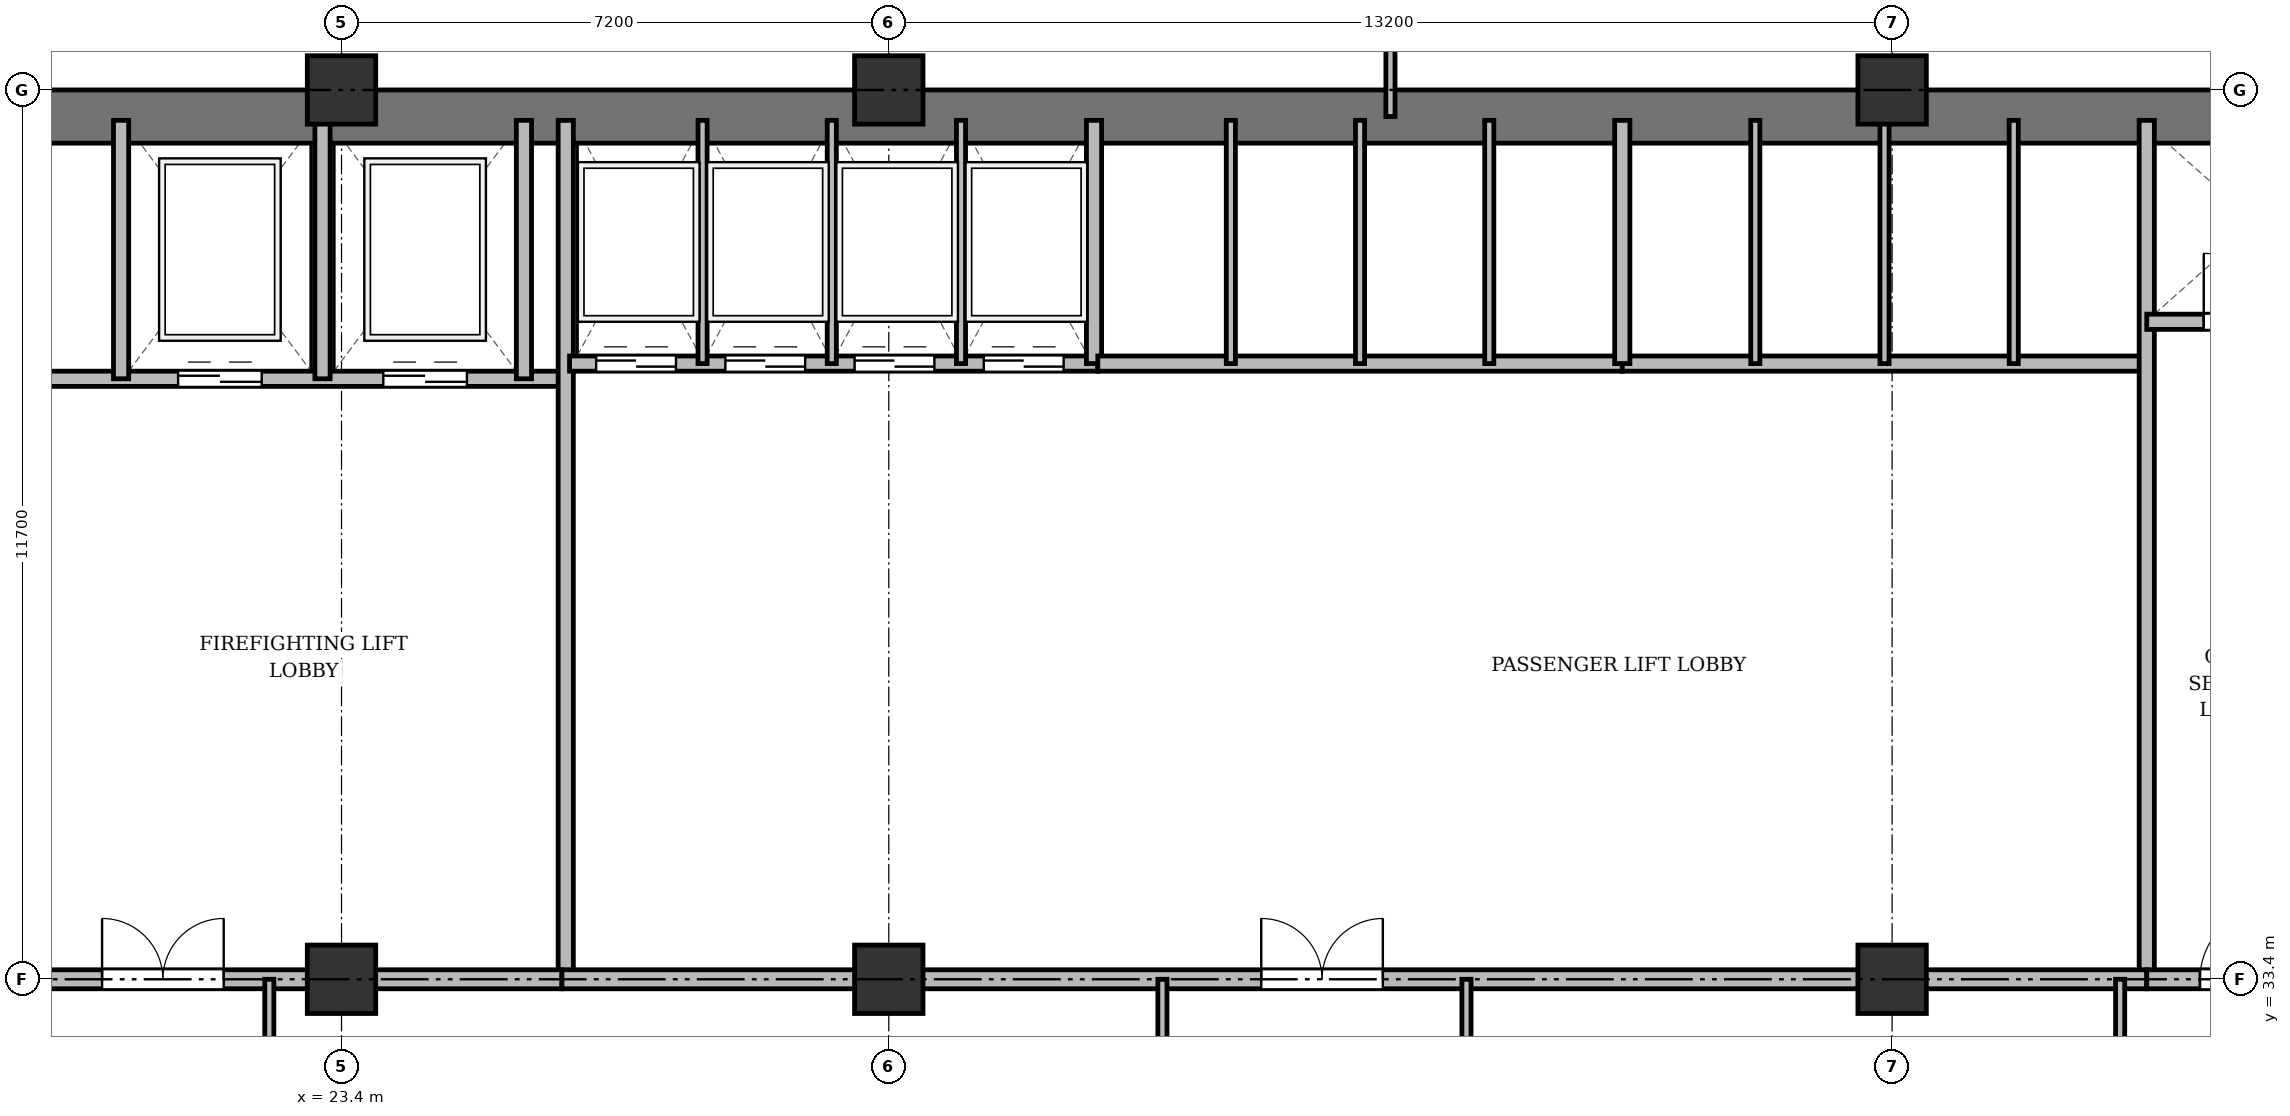
"""IFC4 building model, lengths in metres.
Left out: names, types, materials, properties, quantities, classifications, styles, units other than length and angle.
Written with IfcOpenShell. Run it as: python <this file> out.ifc"""

import sys

from ifc_helpers import new_model, si_unit, direction, frame, frame_2d, origin, origin_2d, place, context, subcontext, project, spatial, rectangle, extrude, source, transform, mapped, element, fill, save


model = new_model("IFC4")
c1 = context("Model", 3, precision=1e-05, world=origin(), true_north=direction((0.0, 1.0)))
c2 = subcontext(c1, "Body", "Model", "MODEL_VIEW")
j1 = project(units=[si_unit("LENGTHUNIT", "METRE"), si_unit("PLANEANGLEUNIT", "RADIAN")], contexts=[c1])
p1 = place(None, origin())
s1 = spatial("IfcSite", under=j1, at=p1, CompositionType="ELEMENT")
p2 = place(p1, origin())
s2 = spatial("IfcBuilding", under=s1, at=p2, CompositionType="ELEMENT")
p3 = place(p2, frame((0.0, 0.0, 41.5)))
s3 = spatial("IfcBuildingStorey", under=s2, at=p3, CompositionType="ELEMENT", Elevation=41.5)
m1 = source(origin(), c2, "Body", "SweptSolid", [
    extrude(rectangle(XDim=0.9, YDim=0.9, at=origin_2d()), origin(), (0.0, 0.0, 1.0), 3.6),
])
for number, where, z_axis, x_axis in (
    (1, (23.4, 33.4, 0.0), (0.0, 0.0, 1.0), (1.0, 0.0, 0.0)),
    (2, (23.4, 45.1, 0.0), (0.0, 0.0, 1.0), (1.0, 0.0, 0.0)),
    (3, (30.6, 33.4, 0.0), (0.0, 0.0, 1.0), (1.0, 0.0, 0.0)),
    (4, (30.6, 45.1, 0.0), (0.0, 0.0, 1.0), (1.0, 0.0, 0.0)),
    (5, (43.8, 33.4, 0.0), (0.0, 0.0, 1.0), (1.0, 0.0, 0.0)),
    (6, (43.8, 45.1, 0.0), (0.0, 0.0, 1.0), (1.0, 0.0, 0.0)),
):
    element("IfcColumn", number, at=place(p3, frame(where, z_axis=z_axis, x_axis=x_axis)), inside=s3, PredefinedType="COLUMN", context=c2, shape_type="MappedRepresentation", body=[
        mapped(m1, transform((0.0, 0.0, 0.0), x_axis=(1.0, 0.0, 0.0), y_axis=(0.0, 1.0, 0.0), z_axis=(0.0, 0.0, 1.0), scale=1.0)),
    ])
p4 = place(p3, frame((15.5, 44.75, 0.0), z_axis=(0.0, 0.0, 1.0), x_axis=(1.0, 0.0, 0.0)))
e7 = element("IfcWall", 7, at=p4, inside=s3, PredefinedType="SHEAR", context=c2, shape_type="SweptSolid", body=[
    extrude(rectangle(XDim=43.4, YDim=0.7, at=frame_2d((21.7, 0.0))), origin(), (0.0, 0.0, 1.0), 3.34),
])
p5 = place(p3, frame((19.55, 41.3, 0.0), z_axis=(0.0, 0.0, 1.0), x_axis=(1.0, 0.0, 0.0)))
e8 = element("IfcWall", 8, at=p5, inside=s3, PredefinedType="SOLIDWALL", context=c2, shape_type="SweptSolid", body=[
    extrude(rectangle(XDim=6.75, YDim=0.2, at=frame_2d((3.375, 0.0))), origin(), (0.0, 0.0, 1.0), 3.34),
])
p6 = place(p5, frame((1.7, 0.0, 0.0)))
e9 = element("IfcOpeningElement", 9, at=p6, cuts=e8, PredefinedType="OPENING", context=c2, shape_type="SweptSolid", body=[
    extrude(rectangle(XDim=1.1, YDim=2.15, at=frame_2d((0.55, 1.075))), frame((0.0, 0.11, 0.0), z_axis=(0.0, -1.0, 0.0), x_axis=(1.0, 0.0, 0.0)), (0.0, 0.0, 1.0), 0.22),
])
p7 = place(p5, frame((4.4, 0.0, 0.0)))
e10 = element("IfcOpeningElement", 10, at=p7, cuts=e8, PredefinedType="OPENING", context=c2, shape_type="SweptSolid", body=[
    extrude(rectangle(XDim=1.1, YDim=2.15, at=frame_2d((0.55, 1.075))), frame((0.0, 0.11, 0.0), z_axis=(0.0, -1.0, 0.0), x_axis=(1.0, 0.0, 0.0)), (0.0, 0.0, 1.0), 0.22),
])
for number, where, z_axis, x_axis in (
    (11, (20.5, 41.3, 0.0), (0.0, 0.0, 1.0), (0.0, 1.0, 0.0)),
    (12, (23.15, 41.3, 0.0), (0.0, 0.0, 1.0), (0.0, 1.0, 0.0)),
    (13, (25.8, 41.3, 0.0), (0.0, 0.0, 1.0), (0.0, 1.0, 0.0)),
):
    element("IfcWall", number, at=place(p3, frame(where, z_axis=z_axis, x_axis=x_axis)), inside=s3, PredefinedType="SOLIDWALL", context=c2, shape_type="SweptSolid", body=[
        extrude(rectangle(XDim=3.4, YDim=0.2, at=frame_2d((1.7, 0.0))), origin(), (0.0, 0.0, 1.0), 3.34),
    ])
p8 = place(p3, frame((26.35, 33.4, 0.0), z_axis=(0.0, 0.0, 1.0), x_axis=(0.0, 1.0, 0.0)))
e14 = element("IfcWall", 14, at=p8, inside=s3, PredefinedType="SOLIDWALL", context=c2, shape_type="SweptSolid", body=[
    extrude(rectangle(XDim=11.3, YDim=0.2, at=frame_2d((5.65, 0.0))), origin(), (0.0, 0.0, 1.0), 2.69),
])
p9 = place(p3, frame((19.5, 33.4, 0.0), z_axis=(0.0, 0.0, 1.0), x_axis=(1.0, 0.0, 0.0)))
e15 = element("IfcWall", 15, at=p9, inside=s3, PredefinedType="PARTITIONING", context=c2, shape_type="SweptSolid", body=[
    extrude(rectangle(XDim=6.8, YDim=0.25, at=frame_2d((3.4, 0.0))), origin(), (0.0, 0.0, 1.0), 2.69),
])
p10 = place(p9, frame((0.75, 0.0, 0.0)))
e16 = element("IfcOpeningElement", 16, at=p10, cuts=e15, PredefinedType="OPENING", context=c2, shape_type="SweptSolid", body=[
    extrude(rectangle(XDim=1.6, YDim=2.2, at=frame_2d((0.8, 1.1))), frame((0.0, 0.135, 0.0), z_axis=(0.0, -1.0, 0.0), x_axis=(1.0, 0.0, 0.0)), (0.0, 0.0, 1.0), 0.27),
])
p11 = place(p3, frame((26.4, 41.5, 0.0), z_axis=(0.0, 0.0, 1.0), x_axis=(1.0, 0.0, 0.0)))
e17 = element("IfcWall", 17, at=p11, inside=s3, PredefinedType="SOLIDWALL", context=c2, shape_type="SweptSolid", body=[
    extrude(rectangle(XDim=6.95, YDim=0.2, at=frame_2d((3.475, 0.0))), origin(), (0.0, 0.0, 1.0), 3.34),
])
p12 = place(p11, frame((0.35, 0.0, 0.0)))
e18 = element("IfcOpeningElement", 18, at=p12, cuts=e17, PredefinedType="OPENING", context=c2, shape_type="SweptSolid", body=[
    extrude(rectangle(XDim=1.05, YDim=2.15, at=frame_2d((0.525, 1.075))), frame((0.0, 0.11, 0.0), z_axis=(0.0, -1.0, 0.0), x_axis=(1.0, 0.0, 0.0)), (0.0, 0.0, 1.0), 0.22),
])
p13 = place(p11, frame((2.05, 0.0, 0.0)))
e19 = element("IfcOpeningElement", 19, at=p13, cuts=e17, PredefinedType="OPENING", context=c2, shape_type="SweptSolid", body=[
    extrude(rectangle(XDim=1.05, YDim=2.15, at=frame_2d((0.525, 1.075))), frame((0.0, 0.11, 0.0), z_axis=(0.0, -1.0, 0.0), x_axis=(1.0, 0.0, 0.0)), (0.0, 0.0, 1.0), 0.22),
])
p14 = place(p11, frame((3.75, 0.0, 0.0)))
e20 = element("IfcOpeningElement", 20, at=p14, cuts=e17, PredefinedType="OPENING", context=c2, shape_type="SweptSolid", body=[
    extrude(rectangle(XDim=1.05, YDim=2.15, at=frame_2d((0.525, 1.075))), frame((0.0, 0.11, 0.0), z_axis=(0.0, -1.0, 0.0), x_axis=(1.0, 0.0, 0.0)), (0.0, 0.0, 1.0), 0.22),
])
p15 = place(p11, frame((5.45, 0.0, 0.0)))
e21 = element("IfcOpeningElement", 21, at=p15, cuts=e17, PredefinedType="OPENING", context=c2, shape_type="SweptSolid", body=[
    extrude(rectangle(XDim=1.05, YDim=2.15, at=frame_2d((0.525, 1.075))), frame((0.0, 0.11, 0.0), z_axis=(0.0, -1.0, 0.0), x_axis=(1.0, 0.0, 0.0)), (0.0, 0.0, 1.0), 0.22),
])
p16 = place(p3, frame((33.3, 41.5, 0.0), z_axis=(0.0, 0.0, 1.0), x_axis=(0.0, 1.0, 0.0)))
e22 = element("IfcWall", 22, at=p16, inside=s3, PredefinedType="SOLIDWALL", context=c2, shape_type="SweptSolid", body=[
    extrude(rectangle(XDim=3.2, YDim=0.2, at=frame_2d((1.6, 0.0))), origin(), (0.0, 0.0, 1.0), 3.34),
])
for number, where, z_axis, x_axis in (
    (23, (28.15, 41.5, 0.0), (0.0, 0.0, 1.0), (0.0, 1.0, 0.0)),
    (24, (29.85, 41.5, 0.0), (0.0, 0.0, 1.0), (0.0, 1.0, 0.0)),
    (25, (31.55, 41.5, 0.0), (0.0, 0.0, 1.0), (0.0, 1.0, 0.0)),
):
    element("IfcWall", number, at=place(p3, frame(where, z_axis=z_axis, x_axis=x_axis)), inside=s3, PredefinedType="PARTITIONING", context=c2, shape_type="SweptSolid", body=[
        extrude(rectangle(XDim=3.2, YDim=0.12, at=frame_2d((1.6, 0.0))), origin(), (0.0, 0.0, 1.0), 3.34),
    ])
p17 = place(p3, frame((33.35, 41.5, 0.0), z_axis=(0.0, 0.0, 1.0), x_axis=(1.0, 0.0, 0.0)))
e26 = element("IfcWall", 26, at=p17, inside=s3, PredefinedType="SOLIDWALL", context=c2, shape_type="SweptSolid", body=[
    extrude(rectangle(XDim=6.9, YDim=0.2, at=frame_2d((3.45, 0.0))), origin(), (0.0, 0.0, 1.0), 3.34),
])
for number, where, z_axis, x_axis in (
    (27, (35.1, 41.5, 0.0), (0.0, 0.0, 1.0), (0.0, 1.0, 0.0)),
    (28, (36.8, 41.5, 0.0), (0.0, 0.0, 1.0), (0.0, 1.0, 0.0)),
    (29, (38.5, 41.5, 0.0), (0.0, 0.0, 1.0), (0.0, 1.0, 0.0)),
):
    element("IfcWall", number, at=place(p3, frame(where, z_axis=z_axis, x_axis=x_axis)), inside=s3, PredefinedType="PARTITIONING", context=c2, shape_type="SweptSolid", body=[
        extrude(rectangle(XDim=3.2, YDim=0.12, at=frame_2d((1.6, 0.0))), origin(), (0.0, 0.0, 1.0), 3.34),
    ])
p18 = place(p3, frame((40.25, 41.5, 0.0), z_axis=(0.0, 0.0, 1.0), x_axis=(1.0, 0.0, 0.0)))
e30 = element("IfcWall", 30, at=p18, inside=s3, PredefinedType="SOLIDWALL", context=c2, shape_type="SweptSolid", body=[
    extrude(rectangle(XDim=6.9, YDim=0.2, at=frame_2d((3.45, 0.0))), origin(), (0.0, 0.0, 1.0), 2.752),
])
p19 = place(p3, frame((40.25, 41.5, 0.0), z_axis=(0.0, 0.0, 1.0), x_axis=(0.0, 1.0, 0.0)))
e31 = element("IfcWall", 31, at=p19, inside=s3, PredefinedType="SOLIDWALL", context=c2, shape_type="SweptSolid", body=[
    extrude(rectangle(XDim=3.2, YDim=0.2, at=frame_2d((1.6, 0.0))), origin(), (0.0, 0.0, 1.0), 3.34),
])
p20 = place(p3, frame((42.0, 41.5, 0.0), z_axis=(0.0, 0.0, 1.0), x_axis=(0.0, 1.0, 0.0)))
e32 = element("IfcWall", 32, at=p20, inside=s3, PredefinedType="PARTITIONING", context=c2, shape_type="SweptSolid", body=[
    extrude(rectangle(XDim=3.2, YDim=0.12, at=frame_2d((1.6, 0.0))), origin(), (0.0, 0.0, 1.0), 3.34),
])
p21 = place(p3, frame((43.7, 41.5, 0.0), z_axis=(0.0, 0.0, 1.0), x_axis=(0.0, 1.0, 0.0)))
e33 = element("IfcWall", 33, at=p21, inside=s3, PredefinedType="PARTITIONING", context=c2, shape_type="SweptSolid", body=[
    extrude(rectangle(XDim=3.2, YDim=0.12, at=frame_2d((1.6, 0.0))), origin(), (0.0, 0.0, 1.0), 2.752),
])
p22 = place(p3, frame((45.4, 41.5, 0.0), z_axis=(0.0, 0.0, 1.0), x_axis=(0.0, 1.0, 0.0)))
e34 = element("IfcWall", 34, at=p22, inside=s3, PredefinedType="PARTITIONING", context=c2, shape_type="SweptSolid", body=[
    extrude(rectangle(XDim=3.2, YDim=0.12, at=frame_2d((1.6, 0.0))), origin(), (0.0, 0.0, 1.0), 3.34),
])
p23 = place(p3, frame((47.15, 33.4, 0.0), z_axis=(0.0, 0.0, 1.0), x_axis=(0.0, 1.0, 0.0)))
e35 = element("IfcWall", 35, at=p23, inside=s3, PredefinedType="SOLIDWALL", context=c2, shape_type="SweptSolid", body=[
    extrude(rectangle(XDim=11.3, YDim=0.2, at=frame_2d((5.65, 0.0))), origin(), (0.0, 0.0, 1.0), 2.69),
])
p24 = place(p3, frame((26.3, 33.4, 0.0), z_axis=(0.0, 0.0, 1.0), x_axis=(1.0, 0.0, 0.0)))
e36 = element("IfcWall", 36, at=p24, inside=s3, PredefinedType="PARTITIONING", context=c2, shape_type="SweptSolid", body=[
    extrude(rectangle(XDim=20.85, YDim=0.25, at=frame_2d((10.425, 0.0))), origin(), (0.0, 0.0, 1.0), 2.69),
])
p25 = place(p24, frame((9.2, 0.0, 0.0)))
e37 = element("IfcOpeningElement", 37, at=p25, cuts=e36, PredefinedType="OPENING", context=c2, shape_type="SweptSolid", body=[
    extrude(rectangle(XDim=1.6, YDim=2.2, at=frame_2d((0.8, 1.1))), frame((0.0, 0.135, 0.0), z_axis=(0.0, -1.0, 0.0), x_axis=(1.0, 0.0, 0.0)), (0.0, 0.0, 1.0), 0.27),
])
p26 = place(p3, frame((47.15, 42.05, 0.0), z_axis=(0.0, 0.0, 1.0), x_axis=(1.0, 0.0, 0.0)))
e38 = element("IfcWall", 38, at=p26, inside=s3, PredefinedType="SOLIDWALL", context=c2, shape_type="SweptSolid", body=[
    extrude(rectangle(XDim=7.85, YDim=0.2, at=frame_2d((3.925, 0.0))), origin(), (0.0, 0.0, 1.0), 2.752),
])
p27 = place(p26, frame((0.75, 0.0, 0.0)))
e39 = element("IfcOpeningElement", 39, at=p27, cuts=e38, PredefinedType="OPENING", context=c2, shape_type="SweptSolid", body=[
    extrude(rectangle(XDim=0.9, YDim=2.1, at=frame_2d((0.45, 1.05))), frame((0.0, 0.11, 0.0), z_axis=(0.0, -1.0, 0.0), x_axis=(1.0, 0.0, 0.0)), (0.0, 0.0, 1.0), 0.22),
])
p28 = place(p26, frame((3.85, 0.0, 0.0)))
e40 = element("IfcOpeningElement", 40, at=p28, cuts=e38, PredefinedType="OPENING", context=c2, shape_type="SweptSolid", body=[
    extrude(rectangle(XDim=0.9, YDim=2.1, at=frame_2d((0.45, 1.05))), frame((0.0, 0.11, 0.0), z_axis=(0.0, -1.0, 0.0), x_axis=(1.0, 0.0, 0.0)), (0.0, 0.0, 1.0), 0.22),
])
p29 = place(p3, frame((47.15, 33.4, 0.0), z_axis=(0.0, 0.0, 1.0), x_axis=(1.0, 0.0, 0.0)))
e41 = element("IfcWall", 41, at=p29, inside=s3, PredefinedType="PARTITIONING", context=c2, shape_type="SweptSolid", body=[
    extrude(rectangle(XDim=11.15, YDim=0.25, at=frame_2d((5.575, 0.0))), origin(), (0.0, 0.0, 1.0), 2.69),
])
p30 = place(p29, frame((0.7, 0.0, 0.0)))
e42 = element("IfcOpeningElement", 42, at=p30, cuts=e41, PredefinedType="OPENING", context=c2, shape_type="SweptSolid", body=[
    extrude(rectangle(XDim=0.95, YDim=2.15, at=frame_2d((0.475, 1.075))), frame((0.0, 0.135, 0.0), z_axis=(0.0, -1.0, 0.0), x_axis=(1.0, 0.0, 0.0)), (0.0, 0.0, 1.0), 0.27),
])
p31 = place(p29, frame((6.0, 0.0, 0.0)))
e43 = element("IfcOpeningElement", 43, at=p31, cuts=e41, PredefinedType="OPENING", context=c2, shape_type="SweptSolid", body=[
    extrude(rectangle(XDim=1.2, YDim=2.15, at=frame_2d((0.6, 1.075))), frame((0.0, 0.135, 0.0), z_axis=(0.0, -1.0, 0.0), x_axis=(1.0, 0.0, 0.0)), (0.0, 0.0, 1.0), 0.27),
])
for number, where, z_axis, x_axis in (
    (44, (22.45, 29.8, 0.0), (0.0, 0.0, 1.0), (0.0, 1.0, 0.0)),
    (45, (34.2, 29.8, 0.0), (0.0, 0.0, 1.0), (0.0, 1.0, 0.0)),
    (46, (38.2, 29.8, 0.0), (0.0, 0.0, 1.0), (0.0, 1.0, 0.0)),
    (47, (46.8, 29.8, 0.0), (0.0, 0.0, 1.0), (0.0, 1.0, 0.0)),
):
    element("IfcWall", number, at=place(p3, frame(where, z_axis=z_axis, x_axis=x_axis)), inside=s3, PredefinedType="PARTITIONING", context=c2, shape_type="SweptSolid", body=[
        extrude(rectangle(XDim=3.6, YDim=0.12, at=frame_2d((1.8, 0.0))), origin(), (0.0, 0.0, 1.0), 2.69),
    ])
p32 = place(p3, frame((37.2, 44.75, 0.0), z_axis=(0.0, 0.0, 1.0), x_axis=(0.0, 1.0, 0.0)))
e48 = element("IfcWall", 48, at=p32, inside=s3, PredefinedType="PARTITIONING", context=c2, shape_type="SweptSolid", body=[
    extrude(rectangle(XDim=3.61, YDim=0.12, at=frame_2d((1.805, 0.0))), origin(), (0.0, 0.0, 1.0), 2.69),
])
p33 = place(p32, frame((1.1, 0.0, 0.0)))
e49 = element("IfcOpeningElement", 49, at=p33, cuts=e48, PredefinedType="OPENING", context=c2, shape_type="SweptSolid", body=[
    extrude(rectangle(XDim=0.95, YDim=2.15, at=frame_2d((0.475, 1.075))), frame((0.0, 0.07, 0.0), z_axis=(0.0, -1.0, 0.0), x_axis=(1.0, 0.0, 0.0)), (0.0, 0.0, 1.0), 0.14),
])
m2 = source(origin(), c2, "Body", "SweptSolid", [
    extrude(rectangle(XDim=1.1, YDim=2.15, at=frame_2d((0.55, 1.075))), frame((0.0, 0.025, 0.0), z_axis=(0.0, -1.0, 0.0), x_axis=(1.0, 0.0, 0.0)), (0.0, 0.0, 1.0), 0.05),
])
p34 = place(p6, origin())
e50 = element("IfcDoor", 50, at=p34, inside=s3, OperationType="DOUBLE_DOOR_SLIDING", PredefinedType="DOOR", context=c2, shape_type="MappedRepresentation", body=[
    mapped(m2, transform((0.0, 0.0, 0.0), x_axis=(1.0, 0.0, 0.0), y_axis=(0.0, 1.0, 0.0), z_axis=(0.0, 0.0, 1.0), scale=1.0)),
])
fill(e9, e50)
p35 = place(p7, origin())
e51 = element("IfcDoor", 51, at=p35, inside=s3, OperationType="DOUBLE_DOOR_SLIDING", PredefinedType="DOOR", context=c2, shape_type="MappedRepresentation", body=[
    mapped(m2, transform((0.0, 0.0, 0.0), x_axis=(1.0, 0.0, 0.0), y_axis=(0.0, 1.0, 0.0), z_axis=(0.0, 0.0, 1.0), scale=1.0)),
])
fill(e10, e51)
m3 = source(origin(), c2, "Body", "SweptSolid", [
    extrude(rectangle(XDim=1.6, YDim=2.2, at=frame_2d((0.8, 1.1))), frame((0.0, 0.025, 0.0), z_axis=(0.0, -1.0, 0.0), x_axis=(1.0, 0.0, 0.0)), (0.0, 0.0, 1.0), 0.05),
])
p36 = place(p10, origin())
e52 = element("IfcDoor", 52, at=p36, inside=s3, OperationType="DOUBLE_DOOR_SINGLE_SWING", PredefinedType="DOOR", context=c2, shape_type="MappedRepresentation", body=[
    mapped(m3, transform((0.0, 0.0, 0.0), x_axis=(1.0, 0.0, 0.0), y_axis=(0.0, 1.0, 0.0), z_axis=(0.0, 0.0, 1.0), scale=1.0)),
])
fill(e16, e52)
m4 = source(origin(), c2, "Body", "SweptSolid", [
    extrude(rectangle(XDim=1.05, YDim=2.15, at=frame_2d((0.525, 1.075))), frame((0.0, 0.025, 0.0), z_axis=(0.0, -1.0, 0.0), x_axis=(1.0, 0.0, 0.0)), (0.0, 0.0, 1.0), 0.05),
])
p37 = place(p12, origin())
e53 = element("IfcDoor", 53, at=p37, inside=s3, OperationType="DOUBLE_DOOR_SLIDING", PredefinedType="DOOR", context=c2, shape_type="MappedRepresentation", body=[
    mapped(m4, transform((0.0, 0.0, 0.0), x_axis=(1.0, 0.0, 0.0), y_axis=(0.0, 1.0, 0.0), z_axis=(0.0, 0.0, 1.0), scale=1.0)),
])
fill(e18, e53)
p38 = place(p13, origin())
e54 = element("IfcDoor", 54, at=p38, inside=s3, OperationType="DOUBLE_DOOR_SLIDING", PredefinedType="DOOR", context=c2, shape_type="MappedRepresentation", body=[
    mapped(m4, transform((0.0, 0.0, 0.0), x_axis=(1.0, 0.0, 0.0), y_axis=(0.0, 1.0, 0.0), z_axis=(0.0, 0.0, 1.0), scale=1.0)),
])
fill(e19, e54)
p39 = place(p14, origin())
e55 = element("IfcDoor", 55, at=p39, inside=s3, OperationType="DOUBLE_DOOR_SLIDING", PredefinedType="DOOR", context=c2, shape_type="MappedRepresentation", body=[
    mapped(m4, transform((0.0, 0.0, 0.0), x_axis=(1.0, 0.0, 0.0), y_axis=(0.0, 1.0, 0.0), z_axis=(0.0, 0.0, 1.0), scale=1.0)),
])
fill(e20, e55)
p40 = place(p15, origin())
e56 = element("IfcDoor", 56, at=p40, inside=s3, OperationType="DOUBLE_DOOR_SLIDING", PredefinedType="DOOR", context=c2, shape_type="MappedRepresentation", body=[
    mapped(m4, transform((0.0, 0.0, 0.0), x_axis=(1.0, 0.0, 0.0), y_axis=(0.0, 1.0, 0.0), z_axis=(0.0, 0.0, 1.0), scale=1.0)),
])
fill(e21, e56)
p41 = place(p25, origin())
e57 = element("IfcDoor", 57, at=p41, inside=s3, OperationType="DOUBLE_DOOR_SINGLE_SWING", PredefinedType="DOOR", context=c2, shape_type="MappedRepresentation", body=[
    mapped(m3, transform((0.0, 0.0, 0.0), x_axis=(1.0, 0.0, 0.0), y_axis=(0.0, 1.0, 0.0), z_axis=(0.0, 0.0, 1.0), scale=1.0)),
])
fill(e37, e57)
m5 = source(origin(), c2, "Body", "SweptSolid", [
    extrude(rectangle(XDim=0.9, YDim=2.1, at=frame_2d((0.45, 1.05))), frame((0.0, 0.025, 0.0), z_axis=(0.0, -1.0, 0.0), x_axis=(1.0, 0.0, 0.0)), (0.0, 0.0, 1.0), 0.05),
])
p42 = place(p27, origin())
e58 = element("IfcDoor", 58, at=p42, inside=s3, OperationType="SINGLE_SWING_LEFT", PredefinedType="DOOR", context=c2, shape_type="MappedRepresentation", body=[
    mapped(m5, transform((0.0, 0.0, 0.0), x_axis=(1.0, 0.0, 0.0), y_axis=(0.0, 1.0, 0.0), z_axis=(0.0, 0.0, 1.0), scale=1.0)),
])
fill(e39, e58)
m6 = source(origin(), c2, "Body", "SweptSolid", [
    extrude(rectangle(XDim=0.95, YDim=2.15, at=frame_2d((0.475, 1.075))), frame((0.0, 0.025, 0.0), z_axis=(0.0, -1.0, 0.0), x_axis=(1.0, 0.0, 0.0)), (0.0, 0.0, 1.0), 0.05),
])
p43 = place(p30, origin())
e59 = element("IfcDoor", 59, at=p43, inside=s3, OperationType="SINGLE_SWING_RIGHT", PredefinedType="DOOR", context=c2, shape_type="MappedRepresentation", body=[
    mapped(m6, transform((0.0, 0.0, 0.0), x_axis=(1.0, 0.0, 0.0), y_axis=(0.0, 1.0, 0.0), z_axis=(0.0, 0.0, 1.0), scale=1.0)),
])
fill(e42, e59)
save(model, sys.argv[1])
